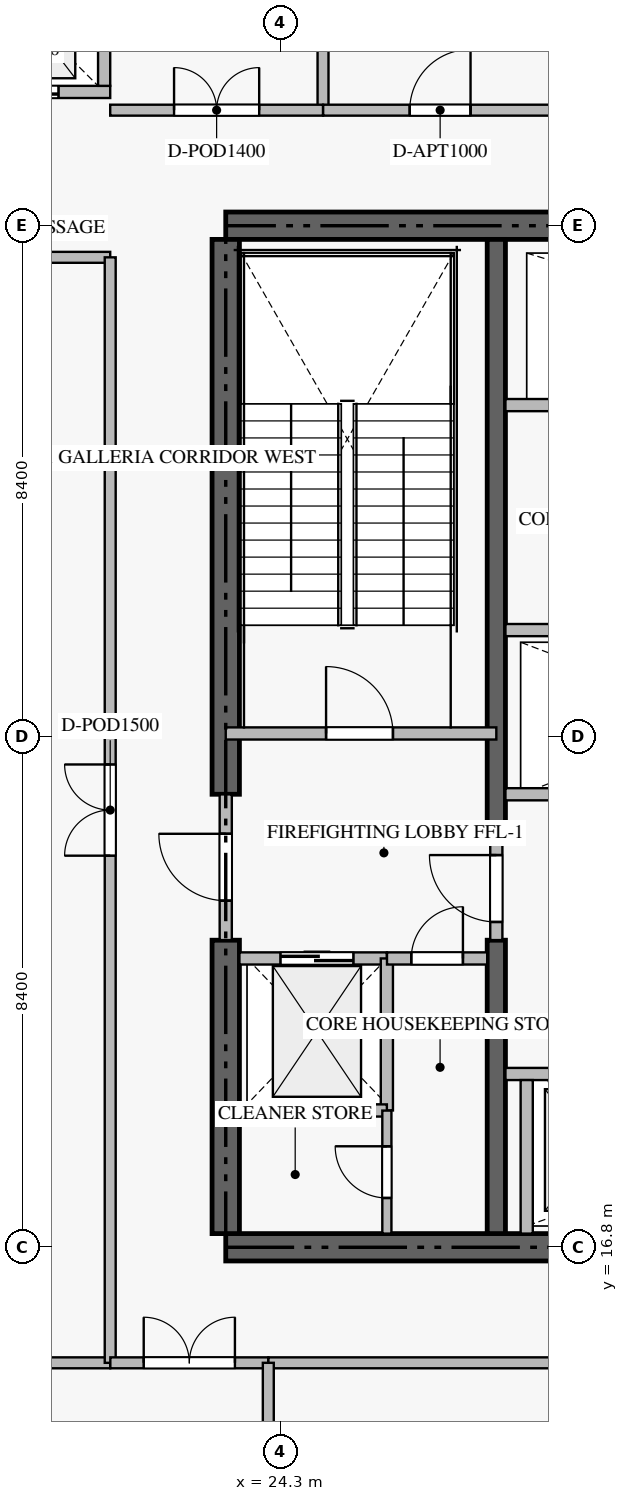
"""IFC4 building model, lengths in metres.
Left out: names, types, materials, properties, quantities, classifications, styles, units other than length and angle.
Written with IfcOpenShell. Run it as: python <this file> out.ifc"""

import sys

from ifc_helpers import new_model, si_unit, direction, frame, frame_2d, origin, place, context, subcontext, project, spatial, rectangle, extrude, source, transform, mapped, element, fill, save


model = new_model("IFC4")
c1 = context("Model", 3, precision=1e-05, world=origin(), true_north=direction((0.0, 1.0)))
c2 = subcontext(c1, "Body", "Model", "MODEL_VIEW")
j1 = project(units=[si_unit("LENGTHUNIT", "METRE"), si_unit("PLANEANGLEUNIT", "RADIAN")], contexts=[c1])
p1 = place(None, origin())
s1 = spatial("IfcSite", under=j1, at=p1, CompositionType="ELEMENT")
p2 = place(p1, origin())
s2 = spatial("IfcBuilding", under=s1, at=p2, CompositionType="ELEMENT")
p3 = place(p2, frame((0.0, 0.0, 5.5)))
s3 = spatial("IfcBuildingStorey", under=s2, at=p3, CompositionType="ELEMENT", Elevation=5.5)
for number, where, z_axis, x_axis in (
    (1, (23.4, 16.8, -0.38), (0.0, 0.0, 1.0), (1.0, 0.0, 0.0)),
    (2, (41.4, 33.6, -0.38), (0.0, 0.0, 1.0), (-1.0, 0.0, 0.0)),
):
    element("IfcWall", number, at=place(p3, frame(where, z_axis=z_axis, x_axis=x_axis)), inside=s3, PredefinedType="SHEAR", context=c2, shape_type="SweptSolid", body=[
        extrude(rectangle(XDim=18.0, YDim=0.45, at=frame_2d((9.0, 0.0))), origin(), (0.0, 0.0, 1.0), 4.998),
    ])
p4 = place(p3, frame((23.4, 17.025, -0.38), z_axis=(0.0, 0.0, 1.0), x_axis=(0.0, 1.0, 0.0)))
e3 = element("IfcWall", 3, at=p4, inside=s3, PredefinedType="SHEAR", context=c2, shape_type="SweptSolid", body=[
    extrude(rectangle(XDim=4.825, YDim=0.45, at=frame_2d((2.413, 0.0))), origin(), (0.0, 0.0, 1.0), 4.998),
])
p5 = place(p3, frame((23.4, 24.25, -0.38), z_axis=(0.0, 0.0, 1.0), x_axis=(0.0, 1.0, 0.0)))
e4 = element("IfcWall", 4, at=p5, inside=s3, PredefinedType="SHEAR", context=c2, shape_type="SweptSolid", body=[
    extrude(rectangle(XDim=9.125, YDim=0.45, at=frame_2d((4.562, 0.0))), origin(), (0.0, 0.0, 1.0), 4.998),
])
p6 = place(p3, frame((27.85, 17.025, -0.38), z_axis=(0.0, 0.0, 1.0), x_axis=(0.0, 1.0, 0.0)))
e5 = element("IfcWall", 5, at=p6, inside=s3, PredefinedType="SHEAR", context=c2, shape_type="SweptSolid", body=[
    extrude(rectangle(XDim=4.825, YDim=0.3, at=frame_2d((2.413, 0.0))), origin(), (0.0, 0.0, 1.0), 4.998),
])
p7 = place(p3, frame((27.85, 23.55, -0.38), z_axis=(0.0, 0.0, 1.0), x_axis=(0.0, 1.0, 0.0)))
e6 = element("IfcWall", 6, at=p7, inside=s3, PredefinedType="SHEAR", context=c2, shape_type="SweptSolid", body=[
    extrude(rectangle(XDim=9.825, YDim=0.3, at=frame_2d((4.913, 0.0))), origin(), (0.0, 0.0, 1.0), 4.998),
])
p8 = place(p3, frame((23.4, 25.25, 0.0), z_axis=(0.0, 0.0, 1.0), x_axis=(1.0, 0.0, 0.0)))
e7 = element("IfcWall", 7, at=p8, inside=s3, PredefinedType="STANDARD", context=c2, shape_type="SweptSolid", body=[
    extrude(rectangle(XDim=4.45, YDim=0.2, at=frame_2d((2.225, 0.0))), origin(), (0.0, 0.0, 1.0), 4.62),
])
p9 = place(p8, frame((1.65, 0.0, 0.0)))
e8 = element("IfcOpeningElement", 8, at=p9, cuts=e7, PredefinedType="OPENING", context=c2, shape_type="SweptSolid", body=[
    extrude(rectangle(XDim=1.1, YDim=2.15, at=frame_2d((0.55, 1.075))), frame((0.0, 0.11, 0.0), z_axis=(0.0, -1.0, 0.0), x_axis=(1.0, 0.0, 0.0)), (0.0, 0.0, 1.0), 0.22),
])
p10 = place(p3, frame((23.625, 21.55, 0.0), z_axis=(0.0, 0.0, 1.0), x_axis=(1.0, 0.0, 0.0)))
e9 = element("IfcWall", 9, at=p10, inside=s3, PredefinedType="STANDARD", context=c2, shape_type="SweptSolid", body=[
    extrude(rectangle(XDim=2.425, YDim=0.2, at=frame_2d((1.212, 0.0))), origin(), (0.0, 0.0, 1.0), 4.62),
])
p11 = place(p10, frame((0.675, 0.0, 0.0)))
e10 = element("IfcOpeningElement", 10, at=p11, cuts=e9, PredefinedType="OPENING", context=c2, shape_type="SweptSolid", body=[
    extrude(rectangle(XDim=1.2, YDim=2.2, at=frame_2d((0.6, 1.1))), frame((0.0, 0.11, 0.0), z_axis=(0.0, -1.0, 0.0), x_axis=(1.0, 0.0, 0.0)), (0.0, 0.0, 1.0), 0.22),
])
p12 = place(p3, frame((28.0, 19.65, 0.0), z_axis=(0.0, 0.0, 1.0), x_axis=(1.0, 0.0, 0.0)))
e11 = element("IfcWall", 11, at=p12, inside=s3, PredefinedType="STANDARD", context=c2, shape_type="SweptSolid", body=[
    extrude(rectangle(XDim=2.65, YDim=0.2, at=frame_2d((1.325, 0.0))), origin(), (0.0, 0.0, 1.0), 4.62),
])
p13 = place(p12, frame((0.9, 0.0, 0.0)))
e12 = element("IfcOpeningElement", 12, at=p13, cuts=e11, PredefinedType="OPENING", context=c2, shape_type="SweptSolid", body=[
    extrude(rectangle(XDim=1.1, YDim=2.2, at=frame_2d((0.55, 1.1))), frame((0.0, 0.11, 0.0), z_axis=(0.0, -1.0, 0.0), x_axis=(1.0, 0.0, 0.0)), (0.0, 0.0, 1.0), 0.22),
])
p14 = place(p3, frame((28.35, 17.025, 0.0), z_axis=(0.0, 0.0, 1.0), x_axis=(0.0, 1.0, 0.0)))
e13 = element("IfcWall", 13, at=p14, inside=s3, PredefinedType="STANDARD", context=c2, shape_type="SweptSolid", body=[
    extrude(rectangle(XDim=2.525, YDim=0.2, at=frame_2d((1.263, 0.0))), origin(), (0.0, 0.0, 1.0), 4.62),
])
p15 = place(p3, frame((28.0, 24.25, 0.0), z_axis=(0.0, 0.0, 1.0), x_axis=(1.0, 0.0, 0.0)))
e14 = element("IfcWall", 14, at=p15, inside=s3, PredefinedType="STANDARD", context=c2, shape_type="SweptSolid", body=[
    extrude(rectangle(XDim=2.425, YDim=0.2, at=frame_2d((1.212, 0.0))), origin(), (0.0, 0.0, 1.0), 4.62),
])
p16 = place(p3, frame((28.0, 30.65, 0.0), z_axis=(0.0, 0.0, 1.0), x_axis=(1.0, 0.0, 0.0)))
e15 = element("IfcWall", 15, at=p16, inside=s3, PredefinedType="STANDARD", context=c2, shape_type="SweptSolid", body=[
    extrude(rectangle(XDim=2.55, YDim=0.2, at=frame_2d((1.275, 0.0))), origin(), (0.0, 0.0, 1.0), 4.62),
])
p17 = place(p3, frame((18.7, 35.8, 0.0), z_axis=(0.0, 0.0, 1.0), x_axis=(1.0, 0.0, 0.0)))
e16 = element("IfcWall", 16, at=p17, inside=s3, PredefinedType="STANDARD", context=c2, shape_type="SweptSolid", body=[
    extrude(rectangle(XDim=2.8, YDim=0.2, at=frame_2d((1.4, 0.0))), origin(), (0.0, 0.0, 1.0), 4.62),
])
p18 = place(p17, frame((0.85, 0.0, 0.0)))
e17 = element("IfcOpeningElement", 17, at=p18, cuts=e16, PredefinedType="OPENING", context=c2, shape_type="SweptSolid", body=[
    extrude(rectangle(XDim=1.1, YDim=2.2, at=frame_2d((0.55, 1.1))), frame((0.0, 0.11, 0.0), z_axis=(0.0, -1.0, 0.0), x_axis=(1.0, 0.0, 0.0)), (0.0, 0.0, 1.0), 0.22),
])
p19 = place(p3, frame((21.4, 35.9, 0.0), z_axis=(0.0, 0.0, 1.0), x_axis=(0.0, 1.0, 0.0)))
e18 = element("IfcWall", 18, at=p19, inside=s3, PredefinedType="STANDARD", context=c2, shape_type="SweptSolid", body=[
    extrude(rectangle(XDim=2.4, YDim=0.2, at=frame_2d((1.2, 0.0))), origin(), (0.0, 0.0, 1.0), 4.62),
])
p20 = place(p3, frame((26.05, 19.05, 0.0), z_axis=(0.0, 0.0, 1.0), x_axis=(0.0, 1.0, 0.0)))
e19 = element("IfcWall", 19, at=p20, inside=s3, PredefinedType="STANDARD", context=c2, shape_type="SweptSolid", body=[
    extrude(rectangle(XDim=2.5, YDim=0.2, at=frame_2d((1.25, 0.0))), origin(), (0.0, 0.0, 1.0), 4.62),
])
p21 = place(p3, frame((23.625, 19.05, 0.0), z_axis=(0.0, 0.0, 1.0), x_axis=(1.0, 0.0, 0.0)))
e20 = element("IfcWall", 20, at=p21, inside=s3, PredefinedType="STANDARD", context=c2, shape_type="SweptSolid", body=[
    extrude(rectangle(XDim=2.425, YDim=0.2, at=frame_2d((1.212, 0.0))), origin(), (0.0, 0.0, 1.0), 4.62),
])
p22 = place(p3, frame((26.052, 21.55, 0.0), z_axis=(0.0, 0.0, 1.0), x_axis=(1.0, 0.0, 0.0)))
e21 = element("IfcWall", 21, at=p22, inside=s3, PredefinedType="STANDARD", context=c2, shape_type="SweptSolid", body=[
    extrude(rectangle(XDim=1.648, YDim=0.2, at=frame_2d((0.824, 0.0))), origin(), (0.0, 0.0, 1.0), 4.62),
])
p23 = place(p22, frame((0.399, 0.0, 0.0)))
e22 = element("IfcOpeningElement", 22, at=p23, cuts=e21, PredefinedType="OPENING", context=c2, shape_type="SweptSolid", body=[
    extrude(rectangle(XDim=0.85, YDim=2.1, at=frame_2d((0.425, 1.05))), frame((0.0, 0.11, 0.0), z_axis=(0.0, -1.0, 0.0), x_axis=(1.0, 0.0, 0.0)), (0.0, 0.0, 1.0), 0.22),
])
p24 = place(p3, frame((23.4, 21.852, 0.0), z_axis=(0.0, 0.0, 1.0), x_axis=(0.0, 1.0, 0.0)))
e23 = element("IfcWall", 23, at=p24, inside=s3, PredefinedType="STANDARD", context=c2, shape_type="SweptSolid", body=[
    extrude(rectangle(XDim=2.396, YDim=0.2, at=frame_2d((1.198, 0.0))), origin(), (0.0, 0.0, 1.0), 4.62),
])
p25 = place(p24, frame((0.648, 0.0, 0.0)))
e24 = element("IfcOpeningElement", 24, at=p25, cuts=e23, PredefinedType="OPENING", context=c2, shape_type="SweptSolid", body=[
    extrude(rectangle(XDim=1.1, YDim=2.15, at=frame_2d((0.55, 1.075))), frame((0.0, 0.11, 0.0), z_axis=(0.0, -1.0, 0.0), x_axis=(1.0, 0.0, 0.0)), (0.0, 0.0, 1.0), 0.22),
])
p26 = place(p3, frame((27.85, 21.852, 0.0), z_axis=(0.0, 0.0, 1.0), x_axis=(0.0, 1.0, 0.0)))
e25 = element("IfcWall", 25, at=p26, inside=s3, PredefinedType="STANDARD", context=c2, shape_type="SweptSolid", body=[
    extrude(rectangle(XDim=1.696, YDim=0.2, at=frame_2d((0.848, 0.0))), origin(), (0.0, 0.0, 1.0), 4.62),
])
p27 = place(p26, frame((0.298, 0.0, 0.0)))
e26 = element("IfcOpeningElement", 26, at=p27, cuts=e25, PredefinedType="OPENING", context=c2, shape_type="SweptSolid", body=[
    extrude(rectangle(XDim=1.1, YDim=2.15, at=frame_2d((0.55, 1.075))), frame((0.0, 0.11, 0.0), z_axis=(0.0, -1.0, 0.0), x_axis=(1.0, 0.0, 0.0)), (0.0, 0.0, 1.0), 0.22),
])
p28 = place(p3, frame((28.0, 26.95, 0.0), z_axis=(0.0, 0.0, 1.0), x_axis=(1.0, 0.0, 0.0)))
e27 = element("IfcWall", 27, at=p28, inside=s3, PredefinedType="STANDARD", context=c2, shape_type="SweptSolid", body=[
    extrude(rectangle(XDim=6.95, YDim=0.2, at=frame_2d((3.475, 0.0))), origin(), (0.0, 0.0, 1.0), 4.62),
])
p29 = place(p3, frame((26.05, 17.025, 0.0), z_axis=(0.0, 0.0, 1.0), x_axis=(0.0, 1.0, 0.0)))
e28 = element("IfcWall", 28, at=p29, inside=s3, PredefinedType="PARTITIONING", context=c2, shape_type="SweptSolid", body=[
    extrude(rectangle(XDim=2.023, YDim=0.15, at=frame_2d((1.012, 0.0))), origin(), (0.0, 0.0, 1.0), 4.62),
])
p30 = place(p29, frame((0.586, 0.0, 0.0)))
e29 = element("IfcOpeningElement", 29, at=p30, cuts=e28, PredefinedType="OPENING", context=c2, shape_type="SweptSolid", body=[
    extrude(rectangle(XDim=0.85, YDim=2.1, at=frame_2d((0.425, 1.05))), frame((0.0, 0.085, 0.0), z_axis=(0.0, -1.0, 0.0), x_axis=(1.0, 0.0, 0.0)), (0.0, 0.0, 1.0), 0.17),
])
p31 = place(p3, frame((0.082, 14.9, 0.0), z_axis=(0.0, 0.0, 1.0), x_axis=(1.0, 0.0, 0.0)))
e30 = element("IfcWall", 30, at=p31, inside=s3, PredefinedType="PARTITIONING", context=c2, shape_type="SweptSolid", body=[
    extrude(rectangle(XDim=21.418, YDim=0.18, at=frame_2d((10.709, 0.0))), origin(), (0.0, 0.0, 1.0), 4.62),
])
p32 = place(p3, frame((14.08, 33.08, 0.0), z_axis=(0.0, 0.0, 1.0), x_axis=(1.0, 0.0, 0.0)))
e31 = element("IfcWall", 31, at=p32, inside=s3, PredefinedType="PARTITIONING", context=c2, shape_type="SweptSolid", body=[
    extrude(rectangle(XDim=7.42, YDim=0.18, at=frame_2d((3.71, 0.0))), origin(), (0.0, 0.0, 1.0), 4.62),
])
p33 = place(p3, frame((21.5, 14.9, 0.0), z_axis=(0.0, 0.0, 1.0), x_axis=(0.0, 1.0, 0.0)))
e32 = element("IfcWall", 32, at=p33, inside=s3, PredefinedType="PARTITIONING", context=c2, shape_type="SweptSolid", body=[
    extrude(rectangle(XDim=18.18, YDim=0.18, at=frame_2d((9.09, 0.0))), origin(), (0.0, 0.0, 1.0), 4.62),
])
p34 = place(p33, frame((8.34, 0.0, 0.0)))
e33 = element("IfcOpeningElement", 33, at=p34, cuts=e32, PredefinedType="OPENING", context=c2, shape_type="SweptSolid", body=[
    extrude(rectangle(XDim=1.5, YDim=2.25, at=frame_2d((0.75, 1.125))), frame((0.0, 0.1, 0.0), z_axis=(0.0, -1.0, 0.0), x_axis=(1.0, 0.0, 0.0)), (0.0, 0.0, 1.0), 0.2),
])
p35 = place(p3, frame((25.0, 35.5, 0.0), z_axis=(0.0, 0.0, 1.0), x_axis=(0.0, 1.0, 0.0)))
e34 = element("IfcWall", 34, at=p35, inside=s3, PredefinedType="PARTITIONING", context=c2, shape_type="SweptSolid", body=[
    extrude(rectangle(XDim=12.418, YDim=0.18, at=frame_2d((6.209, 0.0))), origin(), (0.0, 0.0, 1.0), 4.62),
])
p36 = place(p3, frame((21.502, 14.9, 0.0), z_axis=(0.0, 0.0, 1.0), x_axis=(1.0, 0.0, 0.0)))
e35 = element("IfcWall", 35, at=p36, inside=s3, PredefinedType="PARTITIONING", context=c2, shape_type="SweptSolid", body=[
    extrude(rectangle(XDim=2.598, YDim=0.18, at=frame_2d((1.299, 0.0))), origin(), (0.0, 0.0, 1.0), 4.62),
])
p37 = place(p36, frame((0.549, 0.0, 0.0)))
e36 = element("IfcOpeningElement", 36, at=p37, cuts=e35, PredefinedType="OPENING", context=c2, shape_type="SweptSolid", body=[
    extrude(rectangle(XDim=1.5, YDim=2.25, at=frame_2d((0.75, 1.125))), frame((0.0, 0.1, 0.0), z_axis=(0.0, -1.0, 0.0), x_axis=(1.0, 0.0, 0.0)), (0.0, 0.0, 1.0), 0.2),
])
p38 = place(p3, frame((24.102, 14.9, 0.0), z_axis=(0.0, 0.0, 1.0), x_axis=(1.0, 0.0, 0.0)))
e37 = element("IfcWall", 37, at=p38, inside=s3, PredefinedType="PARTITIONING", context=c2, shape_type="SweptSolid", body=[
    extrude(rectangle(XDim=14.698, YDim=0.18, at=frame_2d((7.349, 0.0))), origin(), (0.0, 0.0, 1.0), 4.62),
])
p39 = place(p38, frame((6.549, 0.0, 0.0)))
e38 = element("IfcOpeningElement", 38, at=p39, cuts=e37, PredefinedType="OPENING", context=c2, shape_type="SweptSolid", body=[
    extrude(rectangle(XDim=1.6, YDim=2.3, at=frame_2d((0.8, 1.15))), frame((0.0, 0.1, 0.0), z_axis=(0.0, -1.0, 0.0), x_axis=(1.0, 0.0, 0.0)), (0.0, 0.0, 1.0), 0.2),
])
p40 = place(p3, frame((21.5, 35.5, 0.0), z_axis=(0.0, 0.0, 1.0), x_axis=(1.0, 0.0, 0.0)))
e39 = element("IfcWall", 39, at=p40, inside=s3, PredefinedType="PARTITIONING", context=c2, shape_type="SweptSolid", body=[
    extrude(rectangle(XDim=3.5, YDim=0.18, at=frame_2d((1.75, 0.0))), origin(), (0.0, 0.0, 1.0), 4.62),
])
p41 = place(p40, frame((1.05, 0.0, 0.0)))
e40 = element("IfcOpeningElement", 40, at=p41, cuts=e39, PredefinedType="OPENING", context=c2, shape_type="SweptSolid", body=[
    extrude(rectangle(XDim=1.4, YDim=2.25, at=frame_2d((0.7, 1.125))), frame((0.0, 0.1, 0.0), z_axis=(0.0, -1.0, 0.0), x_axis=(1.0, 0.0, 0.0)), (0.0, 0.0, 1.0), 0.2),
])
p42 = place(p3, frame((25.002, 35.5, 0.0), z_axis=(0.0, 0.0, 1.0), x_axis=(1.0, 0.0, 0.0)))
e41 = element("IfcWall", 41, at=p42, inside=s3, PredefinedType="PARTITIONING", context=c2, shape_type="SweptSolid", body=[
    extrude(rectangle(XDim=3.848, YDim=0.18, at=frame_2d((1.924, 0.0))), origin(), (0.0, 0.0, 1.0), 4.62),
])
p43 = place(p42, frame((1.424, 0.0, 0.0)))
e42 = element("IfcOpeningElement", 42, at=p43, cuts=e41, PredefinedType="OPENING", context=c2, shape_type="SweptSolid", body=[
    extrude(rectangle(XDim=1.0, YDim=2.15, at=frame_2d((0.5, 1.075))), frame((0.0, 0.1, 0.0), z_axis=(0.0, -1.0, 0.0), x_axis=(1.0, 0.0, 0.0)), (0.0, 0.0, 1.0), 0.2),
])
p44 = place(p3, frame((24.1, 4.282, 0.0), z_axis=(0.0, 0.0, 1.0), x_axis=(0.0, 1.0, 0.0)))
e43 = element("IfcWall", 43, at=p44, inside=s3, PredefinedType="PARTITIONING", context=c2, shape_type="SweptSolid", body=[
    extrude(rectangle(XDim=10.618, YDim=0.18, at=frame_2d((5.309, 0.0))), origin(), (0.0, 0.0, 1.0), 4.62),
])
m1 = source(origin(), c2, "Body", "SweptSolid", [
    extrude(rectangle(XDim=1.1, YDim=2.15, at=frame_2d((0.55, 1.075))), frame((0.0, 0.025, 0.0), z_axis=(0.0, -1.0, 0.0), x_axis=(1.0, 0.0, 0.0)), (0.0, 0.0, 1.0), 0.05),
])
p45 = place(p9, origin())
e44 = element("IfcDoor", 44, at=p45, inside=s3, OperationType="SINGLE_SWING_LEFT", PredefinedType="DOOR", context=c2, shape_type="MappedRepresentation", body=[
    mapped(m1, transform((0.0, 0.0, 0.0), scale=1.0)),
])
fill(e8, e44)
m2 = source(origin(), c2, "Body", "SweptSolid", [
    extrude(rectangle(XDim=1.2, YDim=2.2, at=frame_2d((0.6, 1.1))), frame((0.0, 0.025, 0.0), z_axis=(0.0, -1.0, 0.0), x_axis=(1.0, 0.0, 0.0)), (0.0, 0.0, 1.0), 0.05),
])
p46 = place(p11, origin())
e45 = element("IfcDoor", 45, at=p46, inside=s3, OperationType="DOUBLE_DOOR_SLIDING", PredefinedType="DOOR", context=c2, shape_type="MappedRepresentation", body=[
    mapped(m2, transform((0.0, 0.0, 0.0), scale=1.0)),
])
fill(e10, e45)
m3 = source(origin(), c2, "Body", "SweptSolid", [
    extrude(rectangle(XDim=1.1, YDim=2.2, at=frame_2d((0.55, 1.1))), frame((0.0, 0.025, 0.0), z_axis=(0.0, -1.0, 0.0), x_axis=(1.0, 0.0, 0.0)), (0.0, 0.0, 1.0), 0.05),
])
p47 = place(p18, origin())
e46 = element("IfcDoor", 46, at=p47, inside=s3, OperationType="DOUBLE_DOOR_SLIDING", PredefinedType="DOOR", context=c2, shape_type="MappedRepresentation", body=[
    mapped(m3, transform((0.0, 0.0, 0.0), scale=1.0)),
])
fill(e17, e46)
m4 = source(origin(), c2, "Body", "SweptSolid", [
    extrude(rectangle(XDim=0.85, YDim=2.1, at=frame_2d((0.425, 1.05))), frame((0.0, 0.025, 0.0), z_axis=(0.0, -1.0, 0.0), x_axis=(1.0, 0.0, 0.0)), (0.0, 0.0, 1.0), 0.05),
])
p48 = place(p23, origin())
e47 = element("IfcDoor", 47, at=p48, inside=s3, OperationType="SINGLE_SWING_RIGHT", PredefinedType="DOOR", context=c2, shape_type="MappedRepresentation", body=[
    mapped(m4, transform((0.0, 0.0, 0.0), scale=1.0)),
])
fill(e22, e47)
p49 = place(p25, origin())
e48 = element("IfcDoor", 48, at=p49, inside=s3, OperationType="SINGLE_SWING_RIGHT", PredefinedType="DOOR", context=c2, shape_type="MappedRepresentation", body=[
    mapped(m1, transform((0.0, 0.0, 0.0), scale=1.0)),
])
fill(e24, e48)
p50 = place(p27, origin())
e49 = element("IfcDoor", 49, at=p50, inside=s3, OperationType="SINGLE_SWING_RIGHT", PredefinedType="DOOR", context=c2, shape_type="MappedRepresentation", body=[
    mapped(m1, transform((0.0, 0.0, 0.0), scale=1.0)),
])
fill(e26, e49)
p51 = place(p30, origin())
e50 = element("IfcDoor", 50, at=p51, inside=s3, OperationType="SINGLE_SWING_RIGHT", PredefinedType="DOOR", context=c2, shape_type="MappedRepresentation", body=[
    mapped(m4, transform((0.0, 0.0, 0.0), scale=1.0)),
])
fill(e29, e50)
m5 = source(origin(), c2, "Body", "SweptSolid", [
    extrude(rectangle(XDim=1.5, YDim=2.25, at=frame_2d((0.75, 1.125))), frame((0.0, 0.025, 0.0), z_axis=(0.0, -1.0, 0.0), x_axis=(1.0, 0.0, 0.0)), (0.0, 0.0, 1.0), 0.05),
])
p52 = place(p34, origin())
e51 = element("IfcDoor", 51, at=p52, inside=s3, OperationType="DOUBLE_DOOR_SINGLE_SWING", PredefinedType="DOOR", context=c2, shape_type="MappedRepresentation", body=[
    mapped(m5, transform((0.0, 0.0, 0.0), scale=1.0)),
])
fill(e33, e51)
p53 = place(p37, origin())
e52 = element("IfcDoor", 52, at=p53, inside=s3, OperationType="DOUBLE_DOOR_SINGLE_SWING", PredefinedType="DOOR", context=c2, shape_type="MappedRepresentation", body=[
    mapped(m5, transform((0.0, 0.0, 0.0), scale=1.0)),
])
fill(e36, e52)
m6 = source(origin(), c2, "Body", "SweptSolid", [
    extrude(rectangle(XDim=1.4, YDim=2.25, at=frame_2d((0.7, 1.125))), frame((0.0, 0.025, 0.0), z_axis=(0.0, -1.0, 0.0), x_axis=(1.0, 0.0, 0.0)), (0.0, 0.0, 1.0), 0.05),
])
p54 = place(p41, origin())
e53 = element("IfcDoor", 53, at=p54, inside=s3, OperationType="DOUBLE_DOOR_SINGLE_SWING", PredefinedType="DOOR", context=c2, shape_type="MappedRepresentation", body=[
    mapped(m6, transform((0.0, 0.0, 0.0), scale=1.0)),
])
fill(e40, e53)
m7 = source(origin(), c2, "Body", "SweptSolid", [
    extrude(rectangle(XDim=1.0, YDim=2.15, at=frame_2d((0.5, 1.075))), frame((0.0, 0.025, 0.0), z_axis=(0.0, -1.0, 0.0), x_axis=(1.0, 0.0, 0.0)), (0.0, 0.0, 1.0), 0.05),
])
p55 = place(p43, origin())
e54 = element("IfcDoor", 54, at=p55, inside=s3, OperationType="SINGLE_SWING_RIGHT", PredefinedType="DOOR", context=c2, shape_type="MappedRepresentation", body=[
    mapped(m7, transform((0.0, 0.0, 0.0), scale=1.0)),
])
fill(e42, e54)
save(model, sys.argv[1])
